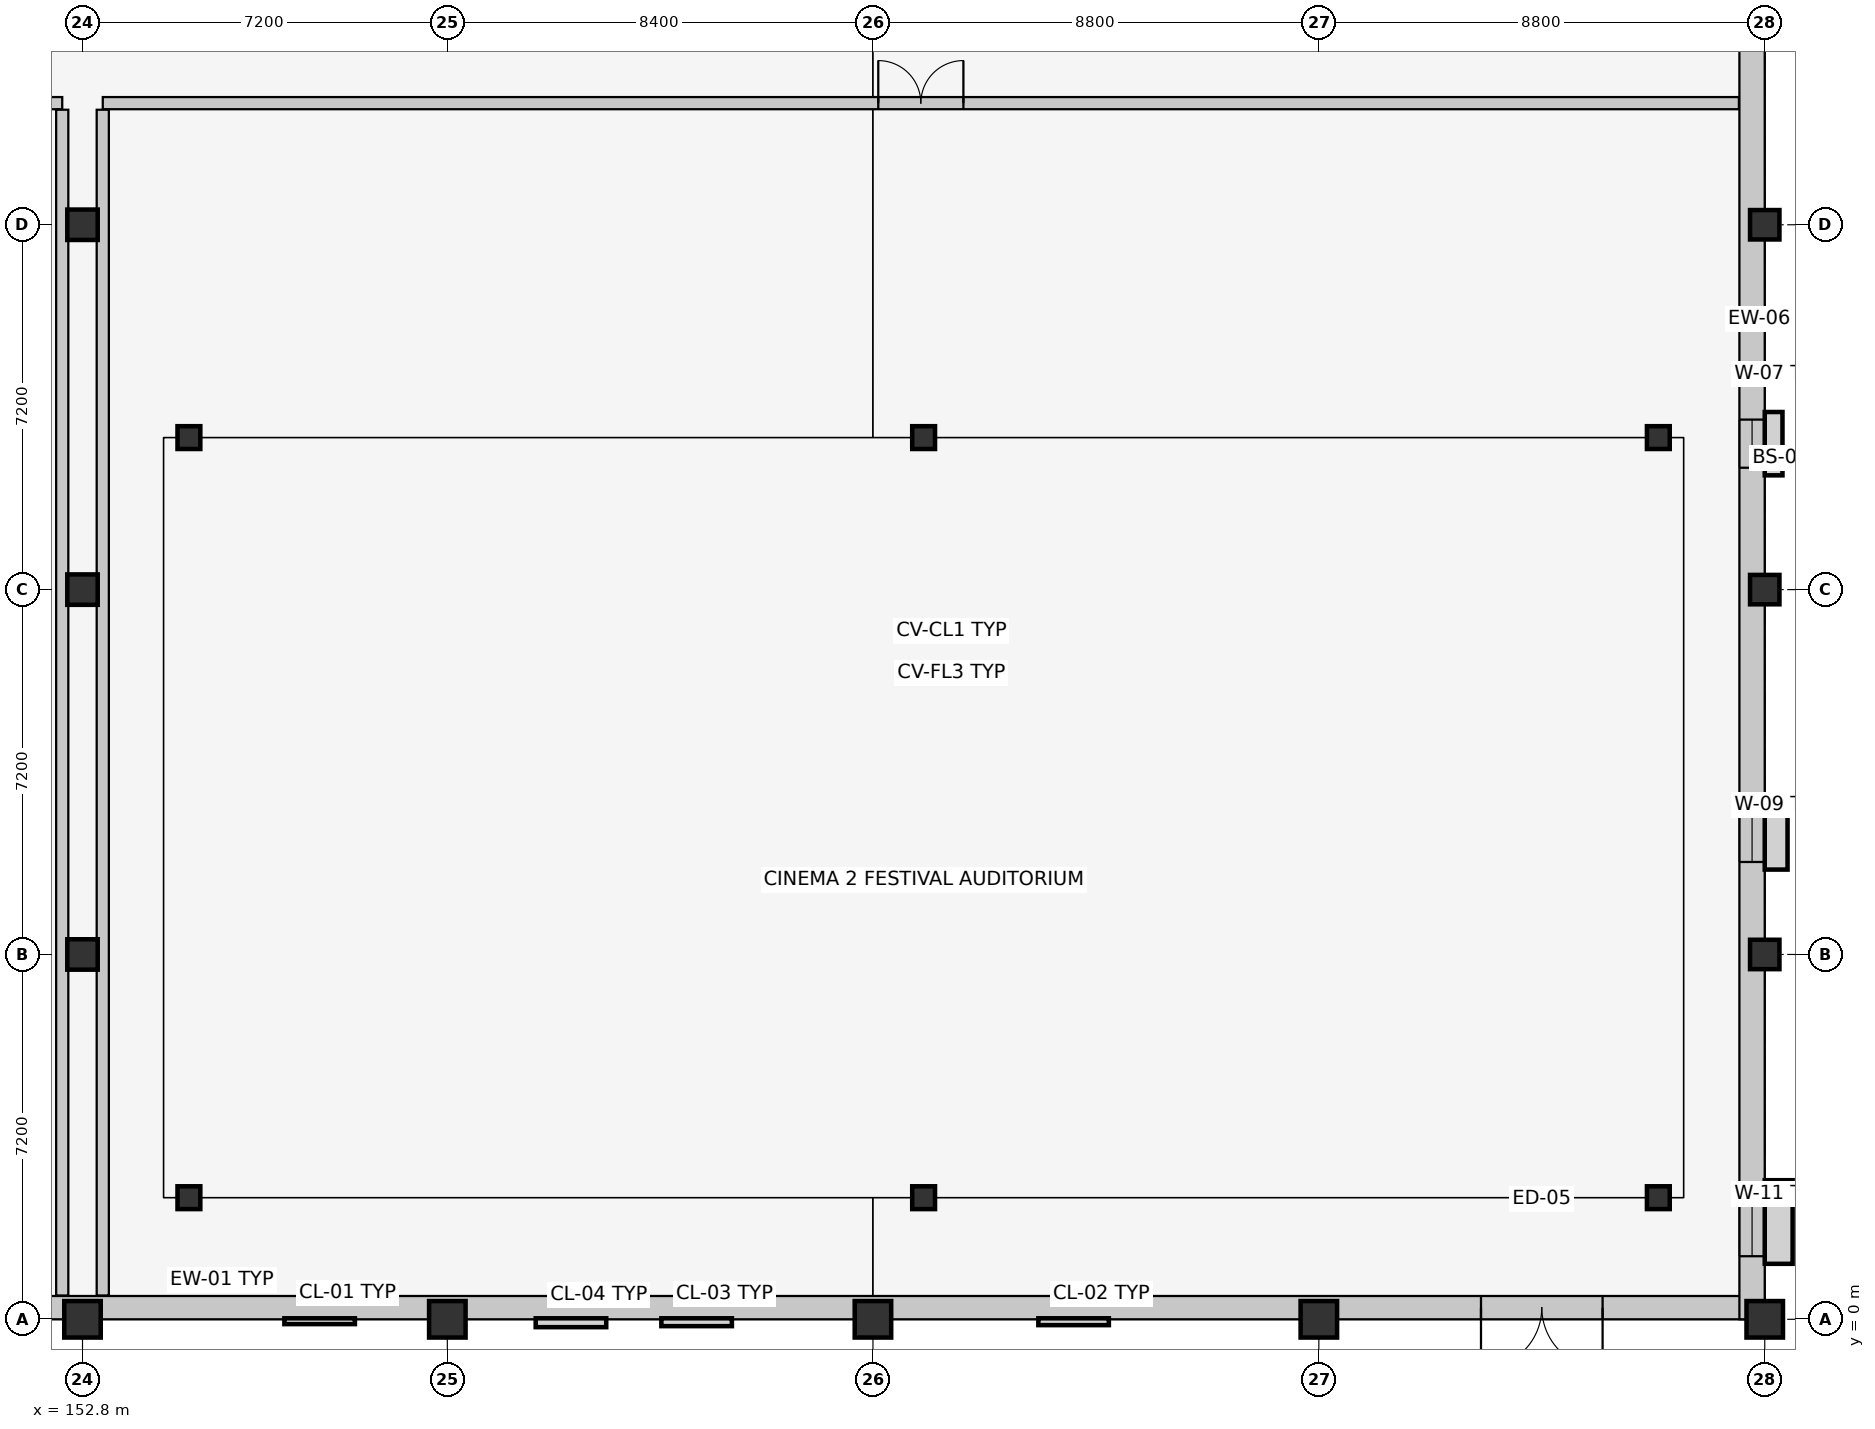
"""IFC4 building model, lengths in metres.
Left out: names, types, materials, properties, quantities, classifications, styles, units other than length and angle.
Written with IfcOpenShell. Run it as: python <this file> out.ifc"""

import sys

from ifc_helpers import new_model, si_unit, direction, frame, frame_2d, origin, origin_2d, place, context, subcontext, project, spatial, rectangle, extrude, element, fill, save


model = new_model("IFC4")
c1 = context("Model", 3, precision=1e-05, world=origin(), true_north=direction((0.0, 1.0)))
c2 = subcontext(c1, "Body", "Model", "MODEL_VIEW")
j1 = project(units=[si_unit("LENGTHUNIT", "METRE"), si_unit("PLANEANGLEUNIT", "RADIAN")], contexts=[c1])
p1 = place(None, origin())
s1 = spatial("IfcSite", under=j1, at=p1, CompositionType="ELEMENT")
p2 = place(p1, origin())
s2 = spatial("IfcBuilding", under=s1, at=p2, CompositionType="ELEMENT")
p3 = place(p2, origin())
s3 = spatial("IfcBuildingStorey", under=s2, at=p3, CompositionType="ELEMENT", Elevation=0.0)
p4 = place(p3, frame((152.8, 0.0, 0.0), z_axis=(0.0, 0.0, 1.0), x_axis=(1.0, 0.0, 0.0)))
e1 = element("IfcColumn", 1, at=p4, inside=s3, PredefinedType="COLUMN", context=c2, shape_type="SweptSolid", body=[
    extrude(rectangle(XDim=0.72, YDim=0.72, at=origin_2d()), origin(), (0.0, 0.0, 1.0), 5.4),
])
for number, where, z_axis, x_axis in (
    (2, (152.8, 7.2, 0.0), (0.0, 0.0, 1.0), (1.0, 0.0, 0.0)),
    (3, (152.8, 14.4, 0.0), (0.0, 0.0, 1.0), (1.0, 0.0, 0.0)),
    (4, (152.8, 21.6, 0.0), (0.0, 0.0, 1.0), (1.0, 0.0, 0.0)),
):
    element("IfcColumn", number, at=place(p3, frame(where, z_axis=z_axis, x_axis=x_axis)), inside=s3, PredefinedType="COLUMN", context=c2, shape_type="SweptSolid", body=[
        extrude(rectangle(XDim=0.6, YDim=0.6, at=origin_2d()), origin(), (0.0, 0.0, 1.0), 5.4),
    ])
for number, where, z_axis, x_axis in (
    (5, (160.0, 0.0, 0.0), (0.0, 0.0, 1.0), (1.0, 0.0, 0.0)),
    (6, (168.4, 0.0, 0.0), (0.0, 0.0, 1.0), (1.0, 0.0, 0.0)),
    (7, (177.2, 0.0, 0.0), (0.0, 0.0, 1.0), (1.0, 0.0, 0.0)),
    (8, (186.0, 0.0, 0.0), (0.0, 0.0, 1.0), (1.0, 0.0, 0.0)),
):
    element("IfcColumn", number, at=place(p3, frame(where, z_axis=z_axis, x_axis=x_axis)), inside=s3, PredefinedType="COLUMN", context=c2, shape_type="SweptSolid", body=[
        extrude(rectangle(XDim=0.72, YDim=0.72, at=origin_2d()), origin(), (0.0, 0.0, 1.0), 5.4),
    ])
for number, where, z_axis, x_axis in (
    (9, (186.0, 7.2, 0.0), (0.0, 0.0, 1.0), (1.0, 0.0, 0.0)),
    (10, (186.0, 14.4, 0.0), (0.0, 0.0, 1.0), (1.0, 0.0, 0.0)),
    (11, (186.0, 21.6, 0.0), (0.0, 0.0, 1.0), (1.0, 0.0, 0.0)),
):
    element("IfcColumn", number, at=place(p3, frame(where, z_axis=z_axis, x_axis=x_axis)), inside=s3, PredefinedType="COLUMN", context=c2, shape_type="SweptSolid", body=[
        extrude(rectangle(XDim=0.58, YDim=0.58, at=origin_2d()), origin(), (0.0, 0.0, 1.0), 5.4),
    ])
p5 = place(p3, frame((154.9, 2.4, -0.55), z_axis=(0.0, 0.0, 1.0), x_axis=(1.0, 0.0, 0.0)))
e12 = element("IfcColumn", 12, at=p5, inside=s3, PredefinedType="COLUMN", context=c2, shape_type="SweptSolid", body=[
    extrude(rectangle(XDim=0.45, YDim=0.45, at=origin_2d()), origin(), (0.0, 0.0, 1.0), 0.945),
])
p6 = place(p3, frame((154.9, 17.4, -0.55), z_axis=(0.0, 0.0, 1.0), x_axis=(1.0, 0.0, 0.0)))
e13 = element("IfcColumn", 13, at=p6, inside=s3, PredefinedType="COLUMN", context=c2, shape_type="SweptSolid", body=[
    extrude(rectangle(XDim=0.45, YDim=0.45, at=origin_2d()), origin(), (0.0, 0.0, 1.0), 4.015),
])
p7 = place(p3, frame((169.4, 2.4, -0.55), z_axis=(0.0, 0.0, 1.0), x_axis=(1.0, 0.0, 0.0)))
e14 = element("IfcColumn", 14, at=p7, inside=s3, PredefinedType="COLUMN", context=c2, shape_type="SweptSolid", body=[
    extrude(rectangle(XDim=0.45, YDim=0.45, at=origin_2d()), origin(), (0.0, 0.0, 1.0), 0.945),
])
p8 = place(p3, frame((169.4, 17.4, -0.55), z_axis=(0.0, 0.0, 1.0), x_axis=(1.0, 0.0, 0.0)))
e15 = element("IfcColumn", 15, at=p8, inside=s3, PredefinedType="COLUMN", context=c2, shape_type="SweptSolid", body=[
    extrude(rectangle(XDim=0.45, YDim=0.45, at=origin_2d()), origin(), (0.0, 0.0, 1.0), 4.015),
])
p9 = place(p3, frame((183.9, 2.4, -0.55), z_axis=(0.0, 0.0, 1.0), x_axis=(1.0, 0.0, 0.0)))
e16 = element("IfcColumn", 16, at=p9, inside=s3, PredefinedType="COLUMN", context=c2, shape_type="SweptSolid", body=[
    extrude(rectangle(XDim=0.45, YDim=0.45, at=origin_2d()), origin(), (0.0, 0.0, 1.0), 0.945),
])
p10 = place(p3, frame((183.9, 17.4, -0.55), z_axis=(0.0, 0.0, 1.0), x_axis=(1.0, 0.0, 0.0)))
e17 = element("IfcColumn", 17, at=p10, inside=s3, PredefinedType="COLUMN", context=c2, shape_type="SweptSolid", body=[
    extrude(rectangle(XDim=0.45, YDim=0.45, at=origin_2d()), origin(), (0.0, 0.0, 1.0), 4.015),
])
p11 = place(p3, frame((186.0, 0.23, 0.0), z_axis=(0.0, 0.0, 1.0), x_axis=(-1.0, 0.0, 0.0)))
e18 = element("IfcWall", 18, at=p11, inside=s3, PredefinedType="SOLIDWALL", context=c2, shape_type="SweptSolid", body=[
    extrude(rectangle(XDim=62.0, YDim=0.46, at=frame_2d((31.0, 0.0))), origin(), (0.0, 0.0, 1.0), 5.4),
])
p12 = place(p11, frame((35.6, 0.0, 0.0)))
e19 = element("IfcOpeningElement", 19, at=p12, cuts=e18, PredefinedType="OPENING", context=c2, shape_type="SweptSolid", body=[
    extrude(rectangle(XDim=2.4, YDim=2.4, at=frame_2d((1.2, 1.2))), frame((0.0, 0.242, 0.0), z_axis=(0.0, -1.0, 0.0), x_axis=(1.0, 0.0, 0.0)), (0.0, 0.0, 1.0), 0.484),
])
p13 = place(p11, frame((3.2, 0.0, 0.0)))
e20 = element("IfcOpeningElement", 20, at=p13, cuts=e18, PredefinedType="OPENING", context=c2, shape_type="SweptSolid", body=[
    extrude(rectangle(XDim=2.4, YDim=2.4, at=frame_2d((1.2, 1.2))), frame((0.0, 0.242, 0.0), z_axis=(0.0, -1.0, 0.0), x_axis=(1.0, 0.0, 0.0)), (0.0, 0.0, 1.0), 0.484),
])
p14 = place(p3, frame((185.75, 38.4, 0.0), z_axis=(0.0, 0.0, 1.0), x_axis=(0.0, -1.0, 0.0)))
e21 = element("IfcWall", 21, at=p14, inside=s3, PredefinedType="SOLIDWALL", context=c2, shape_type="SweptSolid", body=[
    extrude(rectangle(XDim=38.4, YDim=0.5, at=frame_2d((19.2, 0.0))), origin(), (0.0, 0.0, 1.0), 4.275),
])
p15 = place(p14, frame((1.42, 0.0, 0.9)))
e22 = element("IfcOpeningElement", 22, at=p15, cuts=e21, PredefinedType="OPENING", context=c2, shape_type="SweptSolid", body=[
    extrude(rectangle(XDim=1.0, YDim=1.35, at=frame_2d((0.5, 0.675))), frame((0.0, 0.262, 0.0), z_axis=(0.0, -1.0, 0.0), x_axis=(1.0, 0.0, 0.0)), (0.0, 0.0, 1.0), 0.524),
])
p16 = place(p14, frame((5.21, 0.0, 0.9)))
e23 = element("IfcOpeningElement", 23, at=p16, cuts=e21, PredefinedType="OPENING", context=c2, shape_type="SweptSolid", body=[
    extrude(rectangle(XDim=1.1, YDim=1.35, at=frame_2d((0.55, 0.675))), frame((0.0, 0.262, 0.0), z_axis=(0.0, -1.0, 0.0), x_axis=(1.0, 0.0, 0.0)), (0.0, 0.0, 1.0), 0.524),
])
p17 = place(p14, frame((20.645, 0.0, 0.9)))
e24 = element("IfcOpeningElement", 24, at=p17, cuts=e21, PredefinedType="OPENING", context=c2, shape_type="SweptSolid", body=[
    extrude(rectangle(XDim=0.95, YDim=1.45, at=frame_2d((0.475, 0.725))), frame((0.0, 0.262, 0.0), z_axis=(0.0, -1.0, 0.0), x_axis=(1.0, 0.0, 0.0)), (0.0, 0.0, 1.0), 0.524),
])
p18 = place(p14, frame((28.225, 0.0, 0.9)))
e25 = element("IfcOpeningElement", 25, at=p18, cuts=e21, PredefinedType="OPENING", context=c2, shape_type="SweptSolid", body=[
    extrude(rectangle(XDim=1.15, YDim=1.45, at=frame_2d((0.575, 0.725))), frame((0.0, 0.262, 0.0), z_axis=(0.0, -1.0, 0.0), x_axis=(1.0, 0.0, 0.0)), (0.0, 0.0, 1.0), 0.524),
])
p19 = place(p14, frame((35.805, 0.0, 0.9)))
e26 = element("IfcOpeningElement", 26, at=p19, cuts=e21, PredefinedType="OPENING", context=c2, shape_type="SweptSolid", body=[
    extrude(rectangle(XDim=1.35, YDim=1.45, at=frame_2d((0.675, 0.725))), frame((0.0, 0.262, 0.0), z_axis=(0.0, -1.0, 0.0), x_axis=(1.0, 0.0, 0.0)), (0.0, 0.0, 1.0), 0.524),
])
p20 = place(p3, frame((124.51, 24.0, 0.0), z_axis=(0.0, 0.0, 1.0), x_axis=(1.0, 0.0, 0.0)))
e27 = element("IfcWall", 27, at=p20, inside=s3, PredefinedType="PARTITIONING", context=c2, shape_type="SweptSolid", body=[
    extrude(rectangle(XDim=27.89, YDim=0.24, at=frame_2d((13.945, 0.0))), origin(), (0.0, 0.0, 1.0), 5.15),
])
p21 = place(p20, frame((13.065, 0.0, 0.0)))
e28 = element("IfcOpeningElement", 28, at=p21, cuts=e27, PredefinedType="OPENING", context=c2, shape_type="SweptSolid", body=[
    extrude(rectangle(XDim=1.76, YDim=2.3, at=frame_2d((0.88, 1.15))), frame((0.0, 0.132, 0.0), z_axis=(0.0, -1.0, 0.0), x_axis=(1.0, 0.0, 0.0)), (0.0, 0.0, 1.0), 0.264),
])
p22 = place(p3, frame((152.4, 0.47, 0.0), z_axis=(0.0, 0.0, 1.0), x_axis=(0.0, 1.0, 0.0)))
e29 = element("IfcWall", 29, at=p22, inside=s3, PredefinedType="PARTITIONING", context=c2, shape_type="SweptSolid", body=[
    extrude(rectangle(XDim=23.4, YDim=0.24, at=frame_2d((11.7, 0.0))), origin(), (0.0, 0.0, 1.0), 5.15),
])
p23 = place(p3, frame((153.2, 24.0, 0.0), z_axis=(0.0, 0.0, 1.0), x_axis=(1.0, 0.0, 0.0)))
e30 = element("IfcWall", 30, at=p23, inside=s3, PredefinedType="PARTITIONING", context=c2, shape_type="SweptSolid", body=[
    extrude(rectangle(XDim=32.29, YDim=0.24, at=frame_2d((16.145, 0.0))), origin(), (0.0, 0.0, 1.0), 5.15),
])
p24 = place(p23, frame((15.305, 0.0, 0.0)))
e31 = element("IfcOpeningElement", 31, at=p24, cuts=e30, PredefinedType="OPENING", context=c2, shape_type="SweptSolid", body=[
    extrude(rectangle(XDim=1.68, YDim=2.3, at=frame_2d((0.84, 1.15))), frame((0.0, 0.132, 0.0), z_axis=(0.0, -1.0, 0.0), x_axis=(1.0, 0.0, 0.0)), (0.0, 0.0, 1.0), 0.264),
])
p25 = place(p3, frame((153.2, 0.47, 0.0), z_axis=(0.0, 0.0, 1.0), x_axis=(0.0, 1.0, 0.0)))
e32 = element("IfcWall", 32, at=p25, inside=s3, PredefinedType="PARTITIONING", context=c2, shape_type="SweptSolid", body=[
    extrude(rectangle(XDim=23.4, YDim=0.24, at=frame_2d((11.7, 0.0))), origin(), (0.0, 0.0, 1.0), 5.15),
])
p26 = place(p13, origin())
e33 = element("IfcDoor", 33, at=p26, inside=s3, OperationType="DOUBLE_DOOR_SINGLE_SWING", PredefinedType="DOOR", context=c2, shape_type="SweptSolid", body=[
    extrude(rectangle(XDim=2.4, YDim=2.4, at=frame_2d((1.2, 1.2))), frame((0.0, 0.025, 0.0), z_axis=(0.0, -1.0, 0.0), x_axis=(1.0, 0.0, 0.0)), (0.0, 0.0, 1.0), 0.05),
])
fill(e20, e33)
p27 = place(p17, origin())
e34 = element("IfcWindow", 34, at=p27, inside=s3, PartitioningType="SINGLE_PANEL", PredefinedType="WINDOW", context=c2, shape_type="SweptSolid", body=[
    extrude(rectangle(XDim=0.95, YDim=1.45, at=frame_2d((0.475, 0.725))), frame((0.0, 0.03, 0.0), z_axis=(0.0, -1.0, 0.0), x_axis=(1.0, 0.0, 0.0)), (0.0, 0.0, 1.0), 0.06),
])
fill(e24, e34)
p28 = place(p18, origin())
e35 = element("IfcWindow", 35, at=p28, inside=s3, PartitioningType="SINGLE_PANEL", PredefinedType="WINDOW", context=c2, shape_type="SweptSolid", body=[
    extrude(rectangle(XDim=1.15, YDim=1.45, at=frame_2d((0.575, 0.725))), frame((0.0, 0.03, 0.0), z_axis=(0.0, -1.0, 0.0), x_axis=(1.0, 0.0, 0.0)), (0.0, 0.0, 1.0), 0.06),
])
fill(e25, e35)
p29 = place(p19, origin())
e36 = element("IfcWindow", 36, at=p29, inside=s3, PartitioningType="SINGLE_PANEL", PredefinedType="WINDOW", context=c2, shape_type="SweptSolid", body=[
    extrude(rectangle(XDim=1.35, YDim=1.45, at=frame_2d((0.675, 0.725))), frame((0.0, 0.03, 0.0), z_axis=(0.0, -1.0, 0.0), x_axis=(1.0, 0.0, 0.0)), (0.0, 0.0, 1.0), 0.06),
])
fill(e26, e36)
p30 = place(p24, origin())
e37 = element("IfcDoor", 37, at=p30, inside=s3, OperationType="DOUBLE_DOOR_SINGLE_SWING", PredefinedType="DOOR", context=c2, shape_type="SweptSolid", body=[
    extrude(rectangle(XDim=1.68, YDim=2.3, at=frame_2d((0.84, 1.15))), frame((0.0, 0.025, 0.0), z_axis=(0.0, -1.0, 0.0), x_axis=(1.0, 0.0, 0.0)), (0.0, 0.0, 1.0), 0.05),
])
fill(e31, e37)
save(model, sys.argv[1])
